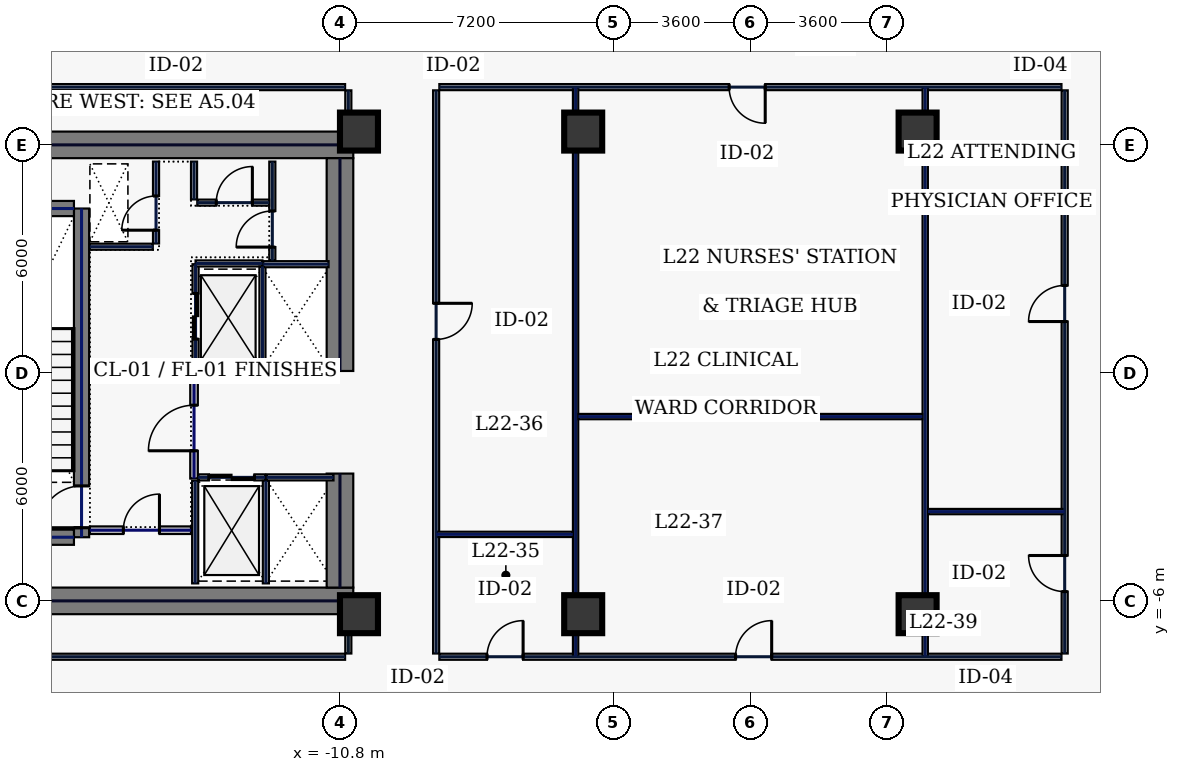
"""IFC4 building model, lengths in metres.
Left out: names, types, materials, properties, quantities, classifications, styles, units other than length and angle.
Written with IfcOpenShell. Run it as: python <this file> out.ifc"""

import sys

from ifc_helpers import new_model, si_unit, direction, frame, frame_2d, origin, origin_2d, place, context, subcontext, project, spatial, rectangle, hollow_rectangle, extrude, element, fill, save


model = new_model("IFC4")
c1 = context("Model", 3, precision=1e-05, world=origin(), true_north=direction((0.0, 1.0)))
c2 = subcontext(c1, "Body", "Model", "MODEL_VIEW")
j1 = project(units=[si_unit("LENGTHUNIT", "METRE"), si_unit("PLANEANGLEUNIT", "RADIAN")], contexts=[c1])
p1 = place(None, origin())
s1 = spatial("IfcSite", under=j1, at=p1, CompositionType="ELEMENT")
p2 = place(p1, origin())
s2 = spatial("IfcBuilding", under=s1, at=p2, CompositionType="ELEMENT")
p3 = place(p2, frame((0.0, 0.0, 101.4)))
s3 = spatial("IfcBuildingStorey", under=s2, at=p3, CompositionType="ELEMENT", Elevation=101.4)
for number, where, z_axis, x_axis in (
    (1, (-22.0, 6.0, 0.0), (0.0, 0.0, 1.0), (1.0, 0.0, 0.0)),
    (2, (-22.0, -6.0, 0.0), (0.0, 0.0, 1.0), (1.0, 0.0, 0.0)),
):
    element("IfcWall", number, at=place(p3, frame(where, z_axis=z_axis, x_axis=x_axis)), inside=s3, PredefinedType="SHEAR", context=c2, shape_type="SweptSolid", body=[
        extrude(rectangle(XDim=11.55, YDim=0.7, at=frame_2d((5.775, 0.0))), origin(), (0.0, 0.0, 1.0), 3.74),
    ])
p4 = place(p3, frame((-10.8, -5.65, 0.0), z_axis=(0.0, 0.0, 1.0), x_axis=(0.0, 1.0, 0.0)))
e3 = element("IfcWall", 3, at=p4, inside=s3, PredefinedType="SHEAR", context=c2, shape_type="SweptSolid", body=[
    extrude(rectangle(XDim=3.0, YDim=0.7, at=frame_2d((1.5, 0.0))), origin(), (0.0, 0.0, 1.0), 3.74),
])
p5 = place(p3, frame((-10.8, 0.05, 0.0), z_axis=(0.0, 0.0, 1.0), x_axis=(0.0, 1.0, 0.0)))
e4 = element("IfcWall", 4, at=p5, inside=s3, PredefinedType="SHEAR", context=c2, shape_type="SweptSolid", body=[
    extrude(rectangle(XDim=5.6, YDim=0.7, at=frame_2d((2.8, 0.0))), origin(), (0.0, 0.0, 1.0), 3.74),
])
p6 = place(p3, frame((-17.6, -4.325, 0.0), z_axis=(0.0, 0.0, 1.0), x_axis=(0.0, 1.0, 0.0)))
e5 = element("IfcWall", 5, at=p6, inside=s3, PredefinedType="SHEAR", context=c2, shape_type="SweptSolid", body=[
    extrude(rectangle(XDim=8.65, YDim=0.4, at=frame_2d((4.325, 0.0))), origin(), (0.0, 0.0, 1.0), 3.74),
])
p7 = place(p6, frame((0.25, 0.0, 0.0)))
e6 = element("IfcOpeningElement", 6, at=p7, cuts=e5, PredefinedType="OPENING", context=c2, shape_type="SweptSolid", body=[
    extrude(rectangle(XDim=1.1, YDim=2.2, at=frame_2d((0.55, 1.1))), frame((0.0, 0.21, 0.0), z_axis=(0.0, -1.0, 0.0), x_axis=(1.0, 0.0, 0.0)), (0.0, 0.0, 1.0), 0.42),
])
for number, where, z_axis, x_axis in (
    (7, (-21.2, -4.325, 0.0), (0.0, 0.0, 1.0), (1.0, 0.0, 0.0)),
    (8, (-21.2, 4.325, 0.0), (0.0, 0.0, 1.0), (1.0, 0.0, 0.0)),
):
    element("IfcWall", number, at=place(p3, frame(where, z_axis=z_axis, x_axis=x_axis)), inside=s3, PredefinedType="SHEAR", context=c2, shape_type="SweptSolid", body=[
        extrude(rectangle(XDim=3.4, YDim=0.4, at=frame_2d((1.7, 0.0))), origin(), (0.0, 0.0, 1.0), 3.74),
    ])
for number, where, z_axis, x_axis in (
    (9, (-10.3, -6.35, 0.0), (0.0, 0.0, 1.0), (1.0, 0.0, 0.0)),
    (10, (-10.3, 6.35, 0.0), (0.0, 0.0, 1.0), (1.0, 0.0, 0.0)),
    (11, (-4.4, -6.35, 0.0), (0.0, 0.0, 1.0), (1.0, 0.0, 0.0)),
    (12, (4.4, -6.35, 0.0), (0.0, 0.0, 1.0), (1.0, 0.0, 0.0)),
    (13, (-4.4, 6.35, 0.0), (0.0, 0.0, 1.0), (1.0, 0.0, 0.0)),
    (14, (4.4, 6.35, 0.0), (0.0, 0.0, 1.0), (1.0, 0.0, 0.0)),
):
    element("IfcColumn", number, at=place(p3, frame(where, z_axis=z_axis, x_axis=x_axis)), inside=s3, PredefinedType="COLUMN", context=c2, shape_type="SweptSolid", body=[
        extrude(hollow_rectangle(XDim=1.0, YDim=1.0, WallThickness=0.045, at=origin_2d()), origin(), (0.0, 0.0, 1.0), 3.74),
    ])
p8 = place(p3, frame((-14.6, 0.12, 0.0), z_axis=(0.0, 0.0, 1.0), x_axis=(0.0, 1.0, 0.0)))
e15 = element("IfcWall", 15, at=p8, inside=s3, PredefinedType="PARTITIONING", context=c2, shape_type="SweptSolid", body=[
    extrude(rectangle(XDim=2.74, YDim=0.16, at=frame_2d((1.37, 0.0))), origin(), (0.0, 0.0, 1.0), 3.74),
])
p9 = place(p8, frame((0.77, 0.0, 0.0)))
e16 = element("IfcOpeningElement", 16, at=p9, cuts=e15, PredefinedType="OPENING", context=c2, shape_type="SweptSolid", body=[
    extrude(rectangle(XDim=1.2, YDim=2.2, at=frame_2d((0.6, 1.1))), frame((0.0, 0.09, 0.0), z_axis=(0.0, -1.0, 0.0), x_axis=(1.0, 0.0, 0.0)), (0.0, 0.0, 1.0), 0.18),
])
for number, where, z_axis, x_axis in (
    (17, (-14.6, 0.1, 0.0), (0.0, 0.0, 1.0), (1.0, 0.0, 0.0)),
    (18, (-14.6, 2.88, 0.0), (0.0, 0.0, 1.0), (1.0, 0.0, 0.0)),
):
    element("IfcWall", number, at=place(p3, frame(where, z_axis=z_axis, x_axis=x_axis)), inside=s3, PredefinedType="PARTITIONING", context=c2, shape_type="SweptSolid", body=[
        extrude(rectangle(XDim=1.76, YDim=0.16, at=frame_2d((0.88, 0.0))), origin(), (0.0, 0.0, 1.0), 3.74),
    ])
p10 = place(p3, frame((-12.84, 0.18, 0.0), z_axis=(0.0, 0.0, 1.0), x_axis=(0.0, 1.0, 0.0)))
e19 = element("IfcWall", 19, at=p10, inside=s3, PredefinedType="PARTITIONING", context=c2, shape_type="SweptSolid", body=[
    extrude(rectangle(XDim=2.62, YDim=0.16, at=frame_2d((1.31, 0.0))), origin(), (0.0, 0.0, 1.0), 3.74),
])
p11 = place(p3, frame((-14.53, -2.75, 0.0), z_axis=(0.0, 0.0, 1.0), x_axis=(1.0, 0.0, 0.0)))
e20 = element("IfcWall", 20, at=p11, inside=s3, PredefinedType="PARTITIONING", context=c2, shape_type="SweptSolid", body=[
    extrude(rectangle(XDim=1.76, YDim=0.16, at=frame_2d((0.88, 0.0))), origin(), (0.0, 0.0, 1.0), 3.74),
])
p12 = place(p11, frame((0.28, 0.0, 0.0)))
e21 = element("IfcOpeningElement", 21, at=p12, cuts=e20, PredefinedType="OPENING", context=c2, shape_type="SweptSolid", body=[
    extrude(rectangle(XDim=1.2, YDim=2.2, at=frame_2d((0.6, 1.1))), frame((0.0, 0.09, 0.0), z_axis=(0.0, -1.0, 0.0), x_axis=(1.0, 0.0, 0.0)), (0.0, 0.0, 1.0), 0.18),
])
for number, where, z_axis, x_axis in (
    (22, (-12.75, -5.54, 0.0), (0.0, 0.0, 1.0), (0.0, 1.0, 0.0)),
    (23, (-14.61, -5.54, 0.0), (0.0, 0.0, 1.0), (0.0, 1.0, 0.0)),
):
    element("IfcWall", number, at=place(p3, frame(where, z_axis=z_axis, x_axis=x_axis)), inside=s3, PredefinedType="PARTITIONING", context=c2, shape_type="SweptSolid", body=[
        extrude(rectangle(XDim=2.7, YDim=0.16, at=frame_2d((1.35, 0.0))), origin(), (0.0, 0.0, 1.0), 3.74),
    ])
p13 = place(p3, frame((-12.73, -2.75, 0.0), z_axis=(0.0, 0.0, 1.0), x_axis=(1.0, 0.0, 0.0)))
e24 = element("IfcWall", 24, at=p13, inside=s3, PredefinedType="PARTITIONING", context=c2, shape_type="SweptSolid", body=[
    extrude(rectangle(XDim=1.76, YDim=0.16, at=frame_2d((0.88, 0.0))), origin(), (0.0, 0.0, 1.0), 3.74),
])
for number, where, z_axis, x_axis in (
    (25, (-12.82, 0.06, 0.0), (0.0, 0.0, 1.0), (1.0, 0.0, 0.0)),
    (26, (-12.82, 2.86, 0.0), (0.0, 0.0, 1.0), (1.0, 0.0, 0.0)),
):
    element("IfcWall", number, at=place(p3, frame(where, z_axis=z_axis, x_axis=x_axis)), inside=s3, PredefinedType="PARTITIONING", context=c2, shape_type="SweptSolid", body=[
        extrude(rectangle(XDim=1.72, YDim=0.16, at=frame_2d((0.86, 0.0))), origin(), (0.0, 0.0, 1.0), 3.74),
    ])
p14 = place(p3, frame((-15.64, 3.405, 0.0), z_axis=(0.0, 0.0, 1.0), x_axis=(0.0, 1.0, 0.0)))
e27 = element("IfcWall", 27, at=p14, inside=s3, PredefinedType="PARTITIONING", context=c2, shape_type="SweptSolid", body=[
    extrude(rectangle(XDim=2.155, YDim=0.16, at=frame_2d((1.078, 0.0))), origin(), (0.0, 0.0, 1.0), 3.74),
])
p15 = place(p14, frame((0.35, 0.0, 0.0)))
e28 = element("IfcOpeningElement", 28, at=p15, cuts=e27, PredefinedType="OPENING", context=c2, shape_type="SweptSolid", body=[
    extrude(rectangle(XDim=0.9, YDim=2.2, at=frame_2d((0.45, 1.1))), frame((0.0, 0.09, 0.0), z_axis=(0.0, -1.0, 0.0), x_axis=(1.0, 0.0, 0.0)), (0.0, 0.0, 1.0), 0.18),
])
p16 = place(p3, frame((-17.38, 3.32, 0.0), z_axis=(0.0, 0.0, 1.0), x_axis=(1.0, 0.0, 0.0)))
e29 = element("IfcWall", 29, at=p16, inside=s3, PredefinedType="PARTITIONING", context=c2, shape_type="SweptSolid", body=[
    extrude(rectangle(XDim=1.655, YDim=0.16, at=frame_2d((0.827, 0.0))), origin(), (0.0, 0.0, 1.0), 3.74),
])
p17 = place(p3, frame((-17.38, -4.14, 0.0), z_axis=(0.0, 0.0, 1.0), x_axis=(1.0, 0.0, 0.0)))
e30 = element("IfcWall", 30, at=p17, inside=s3, PredefinedType="SOLIDWALL", context=c2, shape_type="SweptSolid", body=[
    extrude(rectangle(XDim=2.66, YDim=0.2, at=frame_2d((1.33, 0.0))), origin(), (0.0, 0.0, 1.0), 3.74),
])
p18 = place(p17, frame((0.88, 0.0, 0.0)))
e31 = element("IfcOpeningElement", 31, at=p18, cuts=e30, PredefinedType="OPENING", context=c2, shape_type="SweptSolid", body=[
    extrude(rectangle(XDim=0.95, YDim=2.2, at=frame_2d((0.475, 1.1))), frame((0.0, 0.11, 0.0), z_axis=(0.0, -1.0, 0.0), x_axis=(1.0, 0.0, 0.0)), (0.0, 0.0, 1.0), 0.22),
])
p19 = place(p3, frame((-12.58, 2.96, 0.0), z_axis=(0.0, 0.0, 1.0), x_axis=(0.0, 1.0, 0.0)))
e32 = element("IfcWall", 32, at=p19, inside=s3, PredefinedType="PARTITIONING", context=c2, shape_type="SweptSolid", body=[
    extrude(rectangle(XDim=2.6, YDim=0.16, at=frame_2d((1.3, 0.0))), origin(), (0.0, 0.0, 1.0), 3.74),
])
p20 = place(p19, frame((0.35, 0.0, 0.0)))
e33 = element("IfcOpeningElement", 33, at=p20, cuts=e32, PredefinedType="OPENING", context=c2, shape_type="SweptSolid", body=[
    extrude(rectangle(XDim=0.95, YDim=2.2, at=frame_2d((0.475, 1.1))), frame((0.0, 0.09, 0.0), z_axis=(0.0, -1.0, 0.0), x_axis=(1.0, 0.0, 0.0)), (0.0, 0.0, 1.0), 0.18),
])
p21 = place(p3, frame((-14.555, 4.48, 0.0), z_axis=(0.0, 0.0, 1.0), x_axis=(1.0, 0.0, 0.0)))
e34 = element("IfcWall", 34, at=p21, inside=s3, PredefinedType="PARTITIONING", context=c2, shape_type="SweptSolid", body=[
    extrude(rectangle(XDim=1.89, YDim=0.16, at=frame_2d((0.945, 0.0))), origin(), (0.0, 0.0, 1.0), 3.74),
])
p22 = place(p21, frame((0.5, 0.0, 0.0)))
e35 = element("IfcOpeningElement", 35, at=p22, cuts=e34, PredefinedType="OPENING", context=c2, shape_type="SweptSolid", body=[
    extrude(rectangle(XDim=0.95, YDim=2.2, at=frame_2d((0.475, 1.1))), frame((0.0, 0.09, 0.0), z_axis=(0.0, -1.0, 0.0), x_axis=(1.0, 0.0, 0.0)), (0.0, 0.0, 1.0), 0.18),
])
p23 = place(p3, frame((-14.64, 4.565, 0.0), z_axis=(0.0, 0.0, 1.0), x_axis=(0.0, 1.0, 0.0)))
e36 = element("IfcWall", 36, at=p23, inside=s3, PredefinedType="PARTITIONING", context=c2, shape_type="SweptSolid", body=[
    extrude(rectangle(XDim=0.995, YDim=0.16, at=frame_2d((0.498, 0.0))), origin(), (0.0, 0.0, 1.0), 3.74),
])
p24 = place(p3, frame((-14.64, -2.78, 0.0), z_axis=(0.0, 0.0, 1.0), x_axis=(0.0, 1.0, 0.0)))
e37 = element("IfcWall", 37, at=p24, inside=s3, PredefinedType="SOLIDWALL", context=c2, shape_type="SweptSolid", body=[
    extrude(rectangle(XDim=2.82, YDim=0.2, at=frame_2d((1.41, 0.0))), origin(), (0.0, 0.0, 1.0), 3.74),
])
p25 = place(p24, frame((0.73, 0.0, 0.0)))
e38 = element("IfcOpeningElement", 38, at=p25, cuts=e37, PredefinedType="OPENING", context=c2, shape_type="SweptSolid", body=[
    extrude(rectangle(XDim=1.2, YDim=2.2, at=frame_2d((0.6, 1.1))), frame((0.0, 0.11, 0.0), z_axis=(0.0, -1.0, 0.0), x_axis=(1.0, 0.0, 0.0)), (0.0, 0.0, 1.0), 0.22),
])
p26 = place(p3, frame((8.185, 7.52, 0.0), z_axis=(0.0, 0.0, 1.0), x_axis=(-1.0, 0.0, 0.0)))
e39 = element("IfcWall", 39, at=p26, inside=s3, PredefinedType="PARTITIONING", context=c2, shape_type="SweptSolid", body=[
    extrude(rectangle(XDim=16.37, YDim=0.16, at=frame_2d((8.185, 0.0))), origin(), (0.0, 0.0, 1.0), 3.74),
])
p27 = place(p26, frame((7.795, 0.0, 0.0)))
e40 = element("IfcOpeningElement", 40, at=p27, cuts=e39, PredefinedType="OPENING", context=c2, shape_type="SweptSolid", body=[
    extrude(rectangle(XDim=0.95, YDim=2.2, at=frame_2d((0.475, 1.1))), frame((0.0, 0.09, 0.0), z_axis=(0.0, -1.0, 0.0), x_axis=(1.0, 0.0, 0.0)), (0.0, 0.0, 1.0), 0.18),
])
p28 = place(p3, frame((-8.27, 7.435, 0.0), z_axis=(0.0, 0.0, 1.0), x_axis=(0.0, -1.0, 0.0)))
e41 = element("IfcWall", 41, at=p28, inside=s3, PredefinedType="PARTITIONING", context=c2, shape_type="SweptSolid", body=[
    extrude(rectangle(XDim=14.82, YDim=0.16, at=frame_2d((7.41, 0.0))), origin(), (0.0, 0.0, 1.0), 3.74),
])
p29 = place(p28, frame((5.604, 0.0, 0.0)))
e42 = element("IfcOpeningElement", 42, at=p29, cuts=e41, PredefinedType="OPENING", context=c2, shape_type="SweptSolid", body=[
    extrude(rectangle(XDim=0.95, YDim=2.2, at=frame_2d((0.475, 1.1))), frame((0.0, 0.09, 0.0), z_axis=(0.0, -1.0, 0.0), x_axis=(1.0, 0.0, 0.0)), (0.0, 0.0, 1.0), 0.18),
])
p30 = place(p3, frame((-8.185, -7.47, 0.0), z_axis=(0.0, 0.0, 1.0), x_axis=(1.0, 0.0, 0.0)))
e43 = element("IfcWall", 43, at=p30, inside=s3, PredefinedType="PARTITIONING", context=c2, shape_type="SweptSolid", body=[
    extrude(rectangle(XDim=16.37, YDim=0.16, at=frame_2d((8.185, 0.0))), origin(), (0.0, 0.0, 1.0), 3.74),
])
p31 = place(p30, frame((1.254, 0.0, 0.0)))
e44 = element("IfcOpeningElement", 44, at=p31, cuts=e43, PredefinedType="OPENING", context=c2, shape_type="SweptSolid", body=[
    extrude(rectangle(XDim=0.95, YDim=2.2, at=frame_2d((0.475, 1.1))), frame((0.0, 0.09, 0.0), z_axis=(0.0, -1.0, 0.0), x_axis=(1.0, 0.0, 0.0)), (0.0, 0.0, 1.0), 0.18),
])
p32 = place(p30, frame((7.795, 0.0, 0.0)))
e45 = element("IfcOpeningElement", 45, at=p32, cuts=e43, PredefinedType="OPENING", context=c2, shape_type="SweptSolid", body=[
    extrude(rectangle(XDim=0.95, YDim=2.2, at=frame_2d((0.475, 1.1))), frame((0.0, 0.09, 0.0), z_axis=(0.0, -1.0, 0.0), x_axis=(1.0, 0.0, 0.0)), (0.0, 0.0, 1.0), 0.18),
])
p33 = place(p3, frame((8.27, -7.385, 0.0), z_axis=(0.0, 0.0, 1.0), x_axis=(0.0, 1.0, 0.0)))
e46 = element("IfcWall", 46, at=p33, inside=s3, PredefinedType="PARTITIONING", context=c2, shape_type="SweptSolid", body=[
    extrude(rectangle(XDim=14.82, YDim=0.16, at=frame_2d((7.41, 0.0))), origin(), (0.0, 0.0, 1.0), 3.74),
])
p34 = place(p33, frame((1.629, 0.0, 0.0)))
e47 = element("IfcOpeningElement", 47, at=p34, cuts=e46, PredefinedType="OPENING", context=c2, shape_type="SweptSolid", body=[
    extrude(rectangle(XDim=0.95, YDim=2.2, at=frame_2d((0.475, 1.1))), frame((0.0, 0.09, 0.0), z_axis=(0.0, -1.0, 0.0), x_axis=(1.0, 0.0, 0.0)), (0.0, 0.0, 1.0), 0.18),
])
p35 = place(p33, frame((8.736, 0.0, 0.0)))
e48 = element("IfcOpeningElement", 48, at=p35, cuts=e46, PredefinedType="OPENING", context=c2, shape_type="SweptSolid", body=[
    extrude(rectangle(XDim=0.95, YDim=2.2, at=frame_2d((0.475, 1.1))), frame((0.0, 0.09, 0.0), z_axis=(0.0, -1.0, 0.0), x_axis=(1.0, 0.0, 0.0)), (0.0, 0.0, 1.0), 0.18),
])
p36 = place(p3, frame((-10.58, -7.385, 0.0), z_axis=(0.0, 0.0, 1.0), x_axis=(0.0, 1.0, 0.0)))
e49 = element("IfcWall", 49, at=p36, inside=s3, PredefinedType="PARTITIONING", context=c2, shape_type="SweptSolid", body=[
    extrude(rectangle(XDim=0.965, YDim=0.16, at=frame_2d((0.482, 0.0))), origin(), (0.0, 0.0, 1.0), 3.285),
])
p37 = place(p3, frame((-10.58, 6.42, 0.0), z_axis=(0.0, 0.0, 1.0), x_axis=(0.0, 1.0, 0.0)))
e50 = element("IfcWall", 50, at=p37, inside=s3, PredefinedType="PARTITIONING", context=c2, shape_type="SweptSolid", body=[
    extrude(rectangle(XDim=1.015, YDim=0.16, at=frame_2d((0.508, 0.0))), origin(), (0.0, 0.0, 1.0), 3.74),
])
for number, where, z_axis, x_axis in (
    (51, (-10.665, 7.52, 0.0), (0.0, 0.0, 1.0), (-1.0, 0.0, 0.0)),
    (52, (-25.235, -7.47, 0.0), (0.0, 0.0, 1.0), (1.0, 0.0, 0.0)),
):
    element("IfcWall", number, at=place(p3, frame(where, z_axis=z_axis, x_axis=x_axis)), inside=s3, PredefinedType="PARTITIONING", context=c2, shape_type="SweptSolid", body=[
        extrude(rectangle(XDim=14.57, YDim=0.16, at=frame_2d((7.285, 0.0))), origin(), (0.0, 0.0, 1.0), 3.74),
    ])
for number, where, z_axis, x_axis in (
    (53, (-4.6, -7.465, 0.0), (0.0, 0.0, 1.0), (0.0, 1.0, 0.0)),
    (54, (4.6, -7.465, 0.0), (0.0, 0.0, 1.0), (0.0, 1.0, 0.0)),
):
    element("IfcWall", number, at=place(p3, frame(where, z_axis=z_axis, x_axis=x_axis)), inside=s3, PredefinedType="PARTITIONING", context=c2, shape_type="SweptSolid", body=[
        extrude(rectangle(XDim=14.98, YDim=0.14, at=frame_2d((7.49, 0.0))), origin(), (0.0, 0.0, 1.0), 2.935),
    ])
p38 = place(p3, frame((-4.525, -1.15, 0.0), z_axis=(0.0, 0.0, 1.0), x_axis=(1.0, 0.0, 0.0)))
e55 = element("IfcWall", 55, at=p38, inside=s3, PredefinedType="PARTITIONING", context=c2, shape_type="SweptSolid", body=[
    extrude(rectangle(XDim=9.05, YDim=0.14, at=frame_2d((4.525, 0.0))), origin(), (0.0, 0.0, 1.0), 3.74),
])
for number, where, z_axis, x_axis in (
    (56, (-8.265, -4.25, 0.0), (0.0, 0.0, 1.0), (1.0, 0.0, 0.0)),
    (57, (4.675, -3.65, 0.0), (0.0, 0.0, 1.0), (1.0, 0.0, 0.0)),
):
    element("IfcWall", number, at=place(p3, frame(where, z_axis=z_axis, x_axis=x_axis)), inside=s3, PredefinedType="PARTITIONING", context=c2, shape_type="SweptSolid", body=[
        extrude(rectangle(XDim=3.59, YDim=0.14, at=frame_2d((1.795, 0.0))), origin(), (0.0, 0.0, 1.0), 3.74),
    ])
p39 = place(p7, origin())
e58 = element("IfcDoor", 58, at=p39, inside=s3, OperationType="SINGLE_SWING_LEFT", PredefinedType="DOOR", context=c2, shape_type="SweptSolid", body=[
    extrude(rectangle(XDim=1.1, YDim=2.2, at=frame_2d((0.55, 1.1))), frame((0.0, 0.025, 0.0), z_axis=(0.0, -1.0, 0.0), x_axis=(1.0, 0.0, 0.0)), (0.0, 0.0, 1.0), 0.05),
])
fill(e6, e58)
p40 = place(p9, origin())
e59 = element("IfcDoor", 59, at=p40, inside=s3, OperationType="SLIDING_TO_LEFT", PredefinedType="DOOR", context=c2, shape_type="SweptSolid", body=[
    extrude(rectangle(XDim=1.2, YDim=2.2, at=frame_2d((0.6, 1.1))), frame((0.0, 0.025, 0.0), z_axis=(0.0, -1.0, 0.0), x_axis=(1.0, 0.0, 0.0)), (0.0, 0.0, 1.0), 0.05),
])
fill(e16, e59)
p41 = place(p12, origin())
e60 = element("IfcDoor", 60, at=p41, inside=s3, OperationType="SLIDING_TO_LEFT", PredefinedType="DOOR", context=c2, shape_type="SweptSolid", body=[
    extrude(rectangle(XDim=1.2, YDim=2.2, at=frame_2d((0.6, 1.1))), frame((0.0, 0.025, 0.0), z_axis=(0.0, -1.0, 0.0), x_axis=(1.0, 0.0, 0.0)), (0.0, 0.0, 1.0), 0.05),
])
fill(e21, e60)
p42 = place(p15, origin())
e61 = element("IfcDoor", 61, at=p42, inside=s3, OperationType="SINGLE_SWING_LEFT", PredefinedType="DOOR", context=c2, shape_type="SweptSolid", body=[
    extrude(rectangle(XDim=0.9, YDim=2.2, at=frame_2d((0.45, 1.1))), frame((0.0, 0.025, 0.0), z_axis=(0.0, -1.0, 0.0), x_axis=(1.0, 0.0, 0.0)), (0.0, 0.0, 1.0), 0.05),
])
fill(e28, e61)
p43 = place(p18, origin())
e62 = element("IfcDoor", 62, at=p43, inside=s3, OperationType="SINGLE_SWING_RIGHT", PredefinedType="DOOR", context=c2, shape_type="SweptSolid", body=[
    extrude(rectangle(XDim=0.95, YDim=2.2, at=frame_2d((0.475, 1.1))), frame((0.0, 0.025, 0.0), z_axis=(0.0, -1.0, 0.0), x_axis=(1.0, 0.0, 0.0)), (0.0, 0.0, 1.0), 0.05),
])
fill(e31, e62)
p44 = place(p20, origin())
e63 = element("IfcDoor", 63, at=p44, inside=s3, OperationType="SINGLE_SWING_LEFT", PredefinedType="DOOR", context=c2, shape_type="SweptSolid", body=[
    extrude(rectangle(XDim=0.95, YDim=2.2, at=frame_2d((0.475, 1.1))), frame((0.0, 0.025, 0.0), z_axis=(0.0, -1.0, 0.0), x_axis=(1.0, 0.0, 0.0)), (0.0, 0.0, 1.0), 0.05),
])
fill(e33, e63)
p45 = place(p22, origin())
e64 = element("IfcDoor", 64, at=p45, inside=s3, OperationType="SINGLE_SWING_RIGHT", PredefinedType="DOOR", context=c2, shape_type="SweptSolid", body=[
    extrude(rectangle(XDim=0.95, YDim=2.2, at=frame_2d((0.475, 1.1))), frame((0.0, 0.025, 0.0), z_axis=(0.0, -1.0, 0.0), x_axis=(1.0, 0.0, 0.0)), (0.0, 0.0, 1.0), 0.05),
])
fill(e35, e64)
p46 = place(p25, origin())
e65 = element("IfcDoor", 65, at=p46, inside=s3, OperationType="SINGLE_SWING_LEFT", PredefinedType="DOOR", context=c2, shape_type="SweptSolid", body=[
    extrude(rectangle(XDim=1.2, YDim=2.2, at=frame_2d((0.6, 1.1))), frame((0.0, 0.025, 0.0), z_axis=(0.0, -1.0, 0.0), x_axis=(1.0, 0.0, 0.0)), (0.0, 0.0, 1.0), 0.05),
])
fill(e38, e65)
p47 = place(p31, origin())
e66 = element("IfcDoor", 66, at=p47, inside=s3, OperationType="SINGLE_SWING_RIGHT", PredefinedType="DOOR", context=c2, shape_type="SweptSolid", body=[
    extrude(rectangle(XDim=0.95, YDim=2.2, at=frame_2d((0.475, 1.1))), frame((0.0, 0.025, 0.0), z_axis=(0.0, -1.0, 0.0), x_axis=(1.0, 0.0, 0.0)), (0.0, 0.0, 1.0), 0.05),
])
fill(e44, e66)
p48 = place(p29, origin())
e67 = element("IfcDoor", 67, at=p48, inside=s3, OperationType="SINGLE_SWING_LEFT", PredefinedType="DOOR", context=c2, shape_type="SweptSolid", body=[
    extrude(rectangle(XDim=0.95, YDim=2.2, at=frame_2d((0.475, 1.1))), frame((0.0, 0.025, 0.0), z_axis=(0.0, -1.0, 0.0), x_axis=(1.0, 0.0, 0.0)), (0.0, 0.0, 1.0), 0.05),
])
fill(e42, e67)
p49 = place(p32, origin())
e68 = element("IfcDoor", 68, at=p49, inside=s3, OperationType="SINGLE_SWING_RIGHT", PredefinedType="DOOR", context=c2, shape_type="SweptSolid", body=[
    extrude(rectangle(XDim=0.95, YDim=2.2, at=frame_2d((0.475, 1.1))), frame((0.0, 0.025, 0.0), z_axis=(0.0, -1.0, 0.0), x_axis=(1.0, 0.0, 0.0)), (0.0, 0.0, 1.0), 0.05),
])
fill(e45, e68)
p50 = place(p27, origin())
e69 = element("IfcDoor", 69, at=p50, inside=s3, OperationType="SINGLE_SWING_LEFT", PredefinedType="DOOR", context=c2, shape_type="SweptSolid", body=[
    extrude(rectangle(XDim=0.95, YDim=2.2, at=frame_2d((0.475, 1.1))), frame((0.0, 0.025, 0.0), z_axis=(0.0, -1.0, 0.0), x_axis=(1.0, 0.0, 0.0)), (0.0, 0.0, 1.0), 0.05),
])
fill(e40, e69)
p51 = place(p34, origin())
e70 = element("IfcDoor", 70, at=p51, inside=s3, OperationType="SINGLE_SWING_RIGHT", PredefinedType="DOOR", context=c2, shape_type="SweptSolid", body=[
    extrude(rectangle(XDim=0.95, YDim=2.2, at=frame_2d((0.475, 1.1))), frame((0.0, 0.025, 0.0), z_axis=(0.0, -1.0, 0.0), x_axis=(1.0, 0.0, 0.0)), (0.0, 0.0, 1.0), 0.05),
])
fill(e47, e70)
p52 = place(p35, origin())
e71 = element("IfcDoor", 71, at=p52, inside=s3, OperationType="SINGLE_SWING_LEFT", PredefinedType="DOOR", context=c2, shape_type="SweptSolid", body=[
    extrude(rectangle(XDim=0.95, YDim=2.2, at=frame_2d((0.475, 1.1))), frame((0.0, 0.025, 0.0), z_axis=(0.0, -1.0, 0.0), x_axis=(1.0, 0.0, 0.0)), (0.0, 0.0, 1.0), 0.05),
])
fill(e48, e71)
save(model, sys.argv[1])
